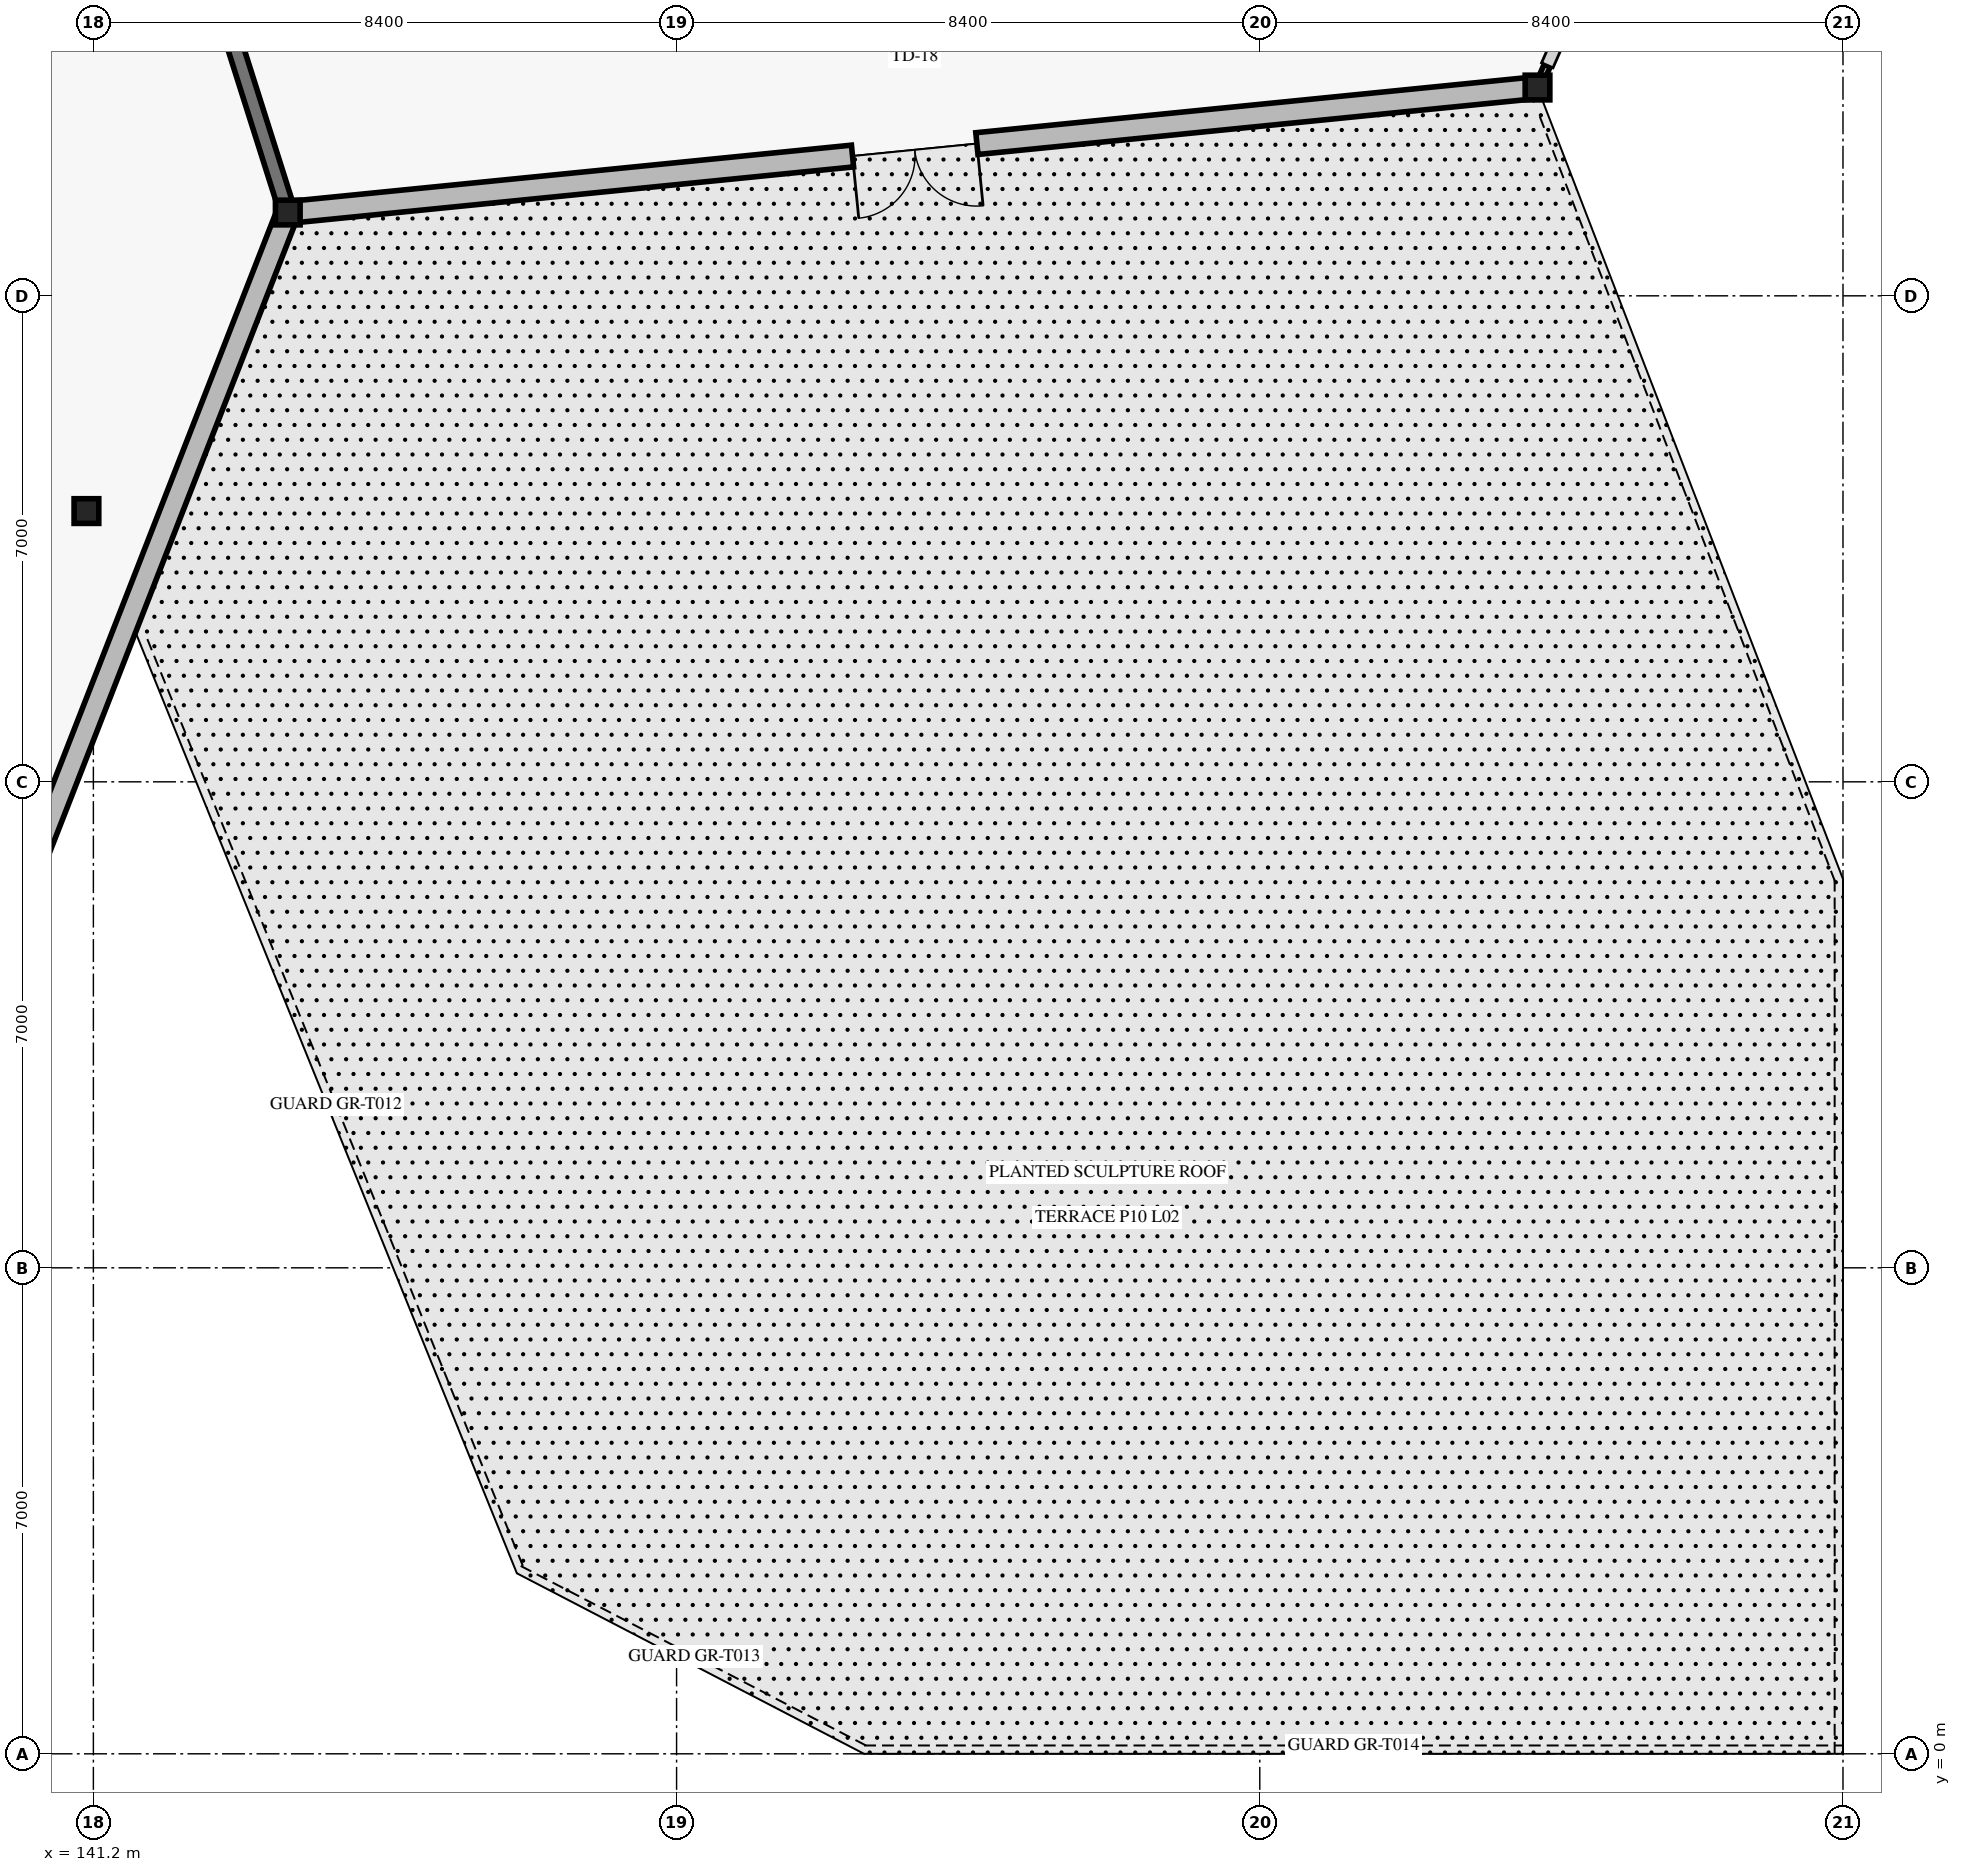
"""IFC4 building model, lengths in metres.
Left out: names, types, materials, properties, quantities, classifications, styles, units other than length and angle.
Written with IfcOpenShell. Run it as: python <this file> out.ifc"""

import sys

from ifc_helpers import new_model, si_unit, direction, frame, frame_2d, origin, origin_2d, place, context, subcontext, project, spatial, rectangle, hollow_circle, extrude, element, fill, save


model = new_model("IFC4")
c1 = context("Model", 3, precision=1e-05, world=origin(), true_north=direction((0.0, 1.0)))
c2 = subcontext(c1, "Body", "Model", "MODEL_VIEW")
j1 = project(units=[si_unit("LENGTHUNIT", "METRE"), si_unit("PLANEANGLEUNIT", "RADIAN")], contexts=[c1])
p1 = place(None, origin())
s1 = spatial("IfcSite", under=j1, at=p1, CompositionType="ELEMENT")
p2 = place(p1, origin())
s2 = spatial("IfcBuilding", under=s1, at=p2, CompositionType="ELEMENT")
p3 = place(p2, frame((0.0, 0.0, 10.2)))
s3 = spatial("IfcBuildingStorey", under=s2, at=p3, CompositionType="ELEMENT", Elevation=10.2)
for number, where, z_axis, x_axis in (
    (1, (141.1, 17.9, 0.0), (0.0, 0.0, 1.0), (1.0, 0.0, 0.0)),
    (2, (144.0, 22.2, 0.0), (0.0, 0.0, 1.0), (1.0, 0.0, 0.0)),
    (3, (162.0, 24.0, 0.0), (0.0, 0.0, 1.0), (1.0, 0.0, 0.0)),
):
    element("IfcColumn", number, at=place(p3, frame(where, z_axis=z_axis, x_axis=x_axis)), inside=s3, PredefinedType="COLUMN", context=c2, shape_type="SweptSolid", body=[
        extrude(hollow_circle(Radius=0.178, WallThickness=0.013, at=origin_2d()), origin(), (0.0, 0.0, 1.0), 4.8),
    ])
p4 = place(p3, frame((143.978, 22.144, 0.0), z_axis=(0.0, 0.0, 1.0), x_axis=(-0.363726839551, -0.93150565548, 0.0)))
e4 = element("IfcWall", 4, at=p4, inside=s3, PredefinedType="SOLIDWALL", context=c2, shape_type="SweptSolid", body=[
    extrude(rectangle(XDim=11.212, YDim=0.315, at=frame_2d((5.606, 0.0))), origin(), (0.0, 0.0, 1.0), 3.62),
])
p5 = place(p3, frame((162.0, 24.0, 0.0), z_axis=(0.0, 0.0, 1.0), x_axis=(-0.99503745835, -0.099501037587, 0.0)))
e5 = element("IfcWall", 5, at=p5, inside=s3, PredefinedType="SOLIDWALL", context=c2, shape_type="SweptSolid", body=[
    extrude(rectangle(XDim=18.029, YDim=0.315, at=frame_2d((9.015, 0.0))), origin(), (0.0, 0.0, 1.0), 3.62),
])
p6 = place(p5, frame((8.115, 0.0, 0.0)))
e6 = element("IfcOpeningElement", 6, at=p6, cuts=e5, PredefinedType="OPENING", context=c2, shape_type="SweptSolid", body=[
    extrude(rectangle(XDim=1.8, YDim=2.25, at=frame_2d((0.9, 1.125))), frame((0.0, 0.167, 0.0), z_axis=(0.0, -1.0, 0.0), x_axis=(1.0, 0.0, 0.0)), (0.0, 0.0, 1.0), 0.335),
])
p7 = place(p3, frame((162.141, 24.32, 0.0), z_axis=(0.0, 0.0, 1.0), x_axis=(-0.402605813257, -0.915373453369, 0.0)))
e7 = element("IfcWall", 7, at=p7, inside=s3, PredefinedType="SOLIDWALL", context=c2, shape_type="SweptSolid", body=[
    extrude(rectangle(XDim=0.308, YDim=0.095, at=frame_2d((0.154, 0.0))), origin(), (0.0, 0.0, 1.0), 3.62),
])
p8 = place(p3, frame((144.0, 22.2, 0.0), z_axis=(0.0, 0.0, 1.0), x_axis=(-0.302243860734, 0.953230637699, 0.0)))
e8 = element("IfcWall", 8, at=p8, inside=s3, PredefinedType="SOLIDWALL", context=c2, shape_type="SweptSolid", body=[
    extrude(rectangle(XDim=21.506, YDim=0.225, at=frame_2d((10.753, 0.0))), origin(), (0.0, 0.0, 1.0), 4.02),
])
p9 = place(p8, frame((12.679, 0.0, 0.0)))
e9 = element("IfcOpeningElement", 9, at=p9, cuts=e8, PredefinedType="OPENING", context=c2, shape_type="SweptSolid", body=[
    extrude(rectangle(XDim=2.0, YDim=2.5, at=frame_2d((1.0, 1.25))), frame((0.0, 0.123, 0.0), z_axis=(0.0, -1.0, 0.0), x_axis=(1.0, 0.0, 0.0)), (0.0, 0.0, 1.0), 0.245),
])
p10 = place(p6, origin())
e10 = element("IfcDoor", 10, at=p10, inside=s3, OperationType="DOUBLE_DOOR_SINGLE_SWING", PredefinedType="DOOR", context=c2, shape_type="SweptSolid", body=[
    extrude(rectangle(XDim=1.8, YDim=2.25, at=frame_2d((0.9, 1.125))), frame((0.0, 0.025, 0.0), z_axis=(0.0, -1.0, 0.0), x_axis=(1.0, 0.0, 0.0)), (0.0, 0.0, 1.0), 0.05),
])
fill(e6, e10)
save(model, sys.argv[1])
